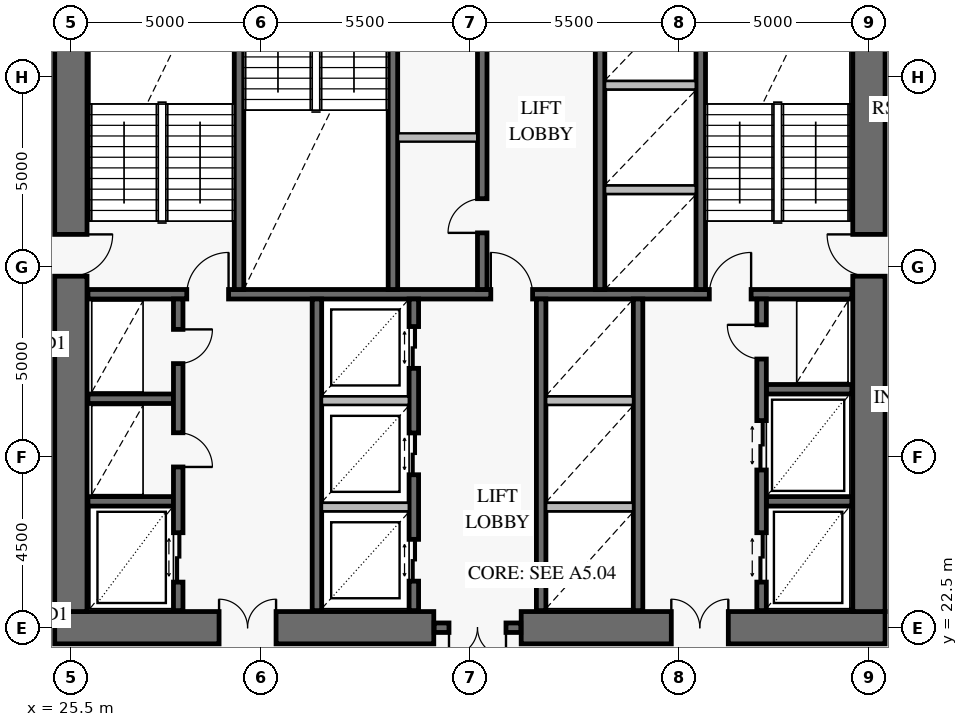
"""IFC4 building model, lengths in metres.
Left out: names, types, materials, properties, quantities, classifications, styles, units other than length and angle.
Written with IfcOpenShell. Run it as: python <this file> out.ifc"""

import sys

from ifc_helpers import new_model, si_unit, direction, frame, frame_2d, origin, place, context, subcontext, project, spatial, rectangle, extrude, element, fill, save


model = new_model("IFC4")
c1 = context("Model", 3, precision=1e-05, world=origin(), true_north=direction((0.0, 1.0)))
c2 = subcontext(c1, "Body", "Model", "MODEL_VIEW")
j1 = project(units=[si_unit("LENGTHUNIT", "METRE"), si_unit("PLANEANGLEUNIT", "RADIAN")], contexts=[c1])
p1 = place(None, origin())
s1 = spatial("IfcSite", under=j1, at=p1, CompositionType="ELEMENT")
p2 = place(p1, origin())
s2 = spatial("IfcBuilding", under=s1, at=p2, CompositionType="ELEMENT")
p3 = place(p2, frame((0.0, 0.0, 41.4)))
s3 = spatial("IfcBuildingStorey", under=s2, at=p3, CompositionType="ELEMENT", Elevation=41.4)
p4 = place(p3, frame((25.075, 22.5, 0.0), z_axis=(0.0, 0.0, 1.0), x_axis=(1.0, 0.0, 0.0)))
e1 = element("IfcWall", 1, at=p4, inside=s3, PredefinedType="SHEAR", context=c2, shape_type="SweptSolid", body=[
    extrude(rectangle(XDim=9.975, YDim=0.85, at=frame_2d((4.988, 0.0))), origin(), (0.0, 0.0, 1.0), 4.2),
])
p5 = place(p4, frame((4.325, 0.0, 0.0)))
e2 = element("IfcOpeningElement", 2, at=p5, cuts=e1, PredefinedType="OPENING", context=c2, shape_type="SweptSolid", body=[
    extrude(rectangle(XDim=1.5, YDim=2.15, at=frame_2d((0.75, 1.075))), frame((0.0, 0.437, 0.0), z_axis=(0.0, -1.0, 0.0), x_axis=(1.0, 0.0, 0.0)), (0.0, 0.0, 1.0), 0.874),
])
p6 = place(p3, frame((37.35, 22.5, 0.0), z_axis=(0.0, 0.0, 1.0), x_axis=(1.0, 0.0, 0.0)))
e3 = element("IfcWall", 3, at=p6, inside=s3, PredefinedType="SHEAR", context=c2, shape_type="SweptSolid", body=[
    extrude(rectangle(XDim=9.575, YDim=0.85, at=frame_2d((4.788, 0.0))), origin(), (0.0, 0.0, 1.0), 4.2),
])
p7 = place(p6, frame((3.95, 0.0, 0.0)))
e4 = element("IfcOpeningElement", 4, at=p7, cuts=e3, PredefinedType="OPENING", context=c2, shape_type="SweptSolid", body=[
    extrude(rectangle(XDim=1.5, YDim=2.15, at=frame_2d((0.75, 1.075))), frame((0.0, 0.437, 0.0), z_axis=(0.0, -1.0, 0.0), x_axis=(1.0, 0.0, 0.0)), (0.0, 0.0, 1.0), 0.874),
])
p8 = place(p3, frame((25.5, 22.925, 0.0), z_axis=(0.0, 0.0, 1.0), x_axis=(0.0, 1.0, 0.0)))
e5 = element("IfcWall", 5, at=p8, inside=s3, PredefinedType="SHEAR", context=c2, shape_type="SweptSolid", body=[
    extrude(rectangle(XDim=18.15, YDim=0.85, at=frame_2d((9.075, 0.0))), origin(), (0.0, 0.0, 1.0), 4.2),
])
p9 = place(p8, frame((8.825, 0.0, 0.0)))
e6 = element("IfcOpeningElement", 6, at=p9, cuts=e5, PredefinedType="OPENING", context=c2, shape_type="SweptSolid", body=[
    extrude(rectangle(XDim=1.1, YDim=2.15, at=frame_2d((0.55, 1.075))), frame((0.0, 0.437, 0.0), z_axis=(0.0, -1.0, 0.0), x_axis=(1.0, 0.0, 0.0)), (0.0, 0.0, 1.0), 0.874),
])
p10 = place(p3, frame((46.5, 22.925, 0.0), z_axis=(0.0, 0.0, 1.0), x_axis=(0.0, 1.0, 0.0)))
e7 = element("IfcWall", 7, at=p10, inside=s3, PredefinedType="SHEAR", context=c2, shape_type="SweptSolid", body=[
    extrude(rectangle(XDim=18.15, YDim=0.85, at=frame_2d((9.075, 0.0))), origin(), (0.0, 0.0, 1.0), 4.2),
])
p11 = place(p10, frame((8.825, 0.0, 0.0)))
e8 = element("IfcOpeningElement", 8, at=p11, cuts=e7, PredefinedType="OPENING", context=c2, shape_type="SweptSolid", body=[
    extrude(rectangle(XDim=1.1, YDim=2.15, at=frame_2d((0.55, 1.075))), frame((0.0, 0.437, 0.0), z_axis=(0.0, -1.0, 0.0), x_axis=(1.0, 0.0, 0.0)), (0.0, 0.0, 1.0), 0.874),
])
p12 = place(p3, frame((35.06, 22.5, 0.0), z_axis=(0.0, 0.0, 1.0), x_axis=(1.0, 0.0, 0.0)))
e9 = element("IfcWall", 9, at=p12, inside=s3, PredefinedType="SOLIDWALL", context=c2, shape_type="SweptSolid", body=[
    extrude(rectangle(XDim=2.28, YDim=0.25, at=frame_2d((1.14, 0.0))), origin(), (0.0, 0.0, 1.0), 4.2),
])
p13 = place(p12, frame((0.39, 0.0, 0.0)))
e10 = element("IfcOpeningElement", 10, at=p13, cuts=e9, PredefinedType="OPENING", context=c2, shape_type="SweptSolid", body=[
    extrude(rectangle(XDim=1.5, YDim=2.15, at=frame_2d((0.75, 1.075))), frame((0.0, 0.137, 0.0), z_axis=(0.0, -1.0, 0.0), x_axis=(1.0, 0.0, 0.0)), (0.0, 0.0, 1.0), 0.274),
])
p14 = place(p3, frame((25.95, 31.275, 0.0), z_axis=(0.0, 0.0, 1.0), x_axis=(1.0, 0.0, 0.0)))
e11 = element("IfcWall", 11, at=p14, inside=s3, PredefinedType="SOLIDWALL", context=c2, shape_type="SweptSolid", body=[
    extrude(rectangle(XDim=20.1, YDim=0.25, at=frame_2d((10.05, 0.0))), origin(), (0.0, 0.0, 1.0), 4.2),
])
p15 = place(p14, frame((2.6, 0.0, 0.0)))
e12 = element("IfcOpeningElement", 12, at=p15, cuts=e11, PredefinedType="OPENING", context=c2, shape_type="SweptSolid", body=[
    extrude(rectangle(XDim=1.1, YDim=2.15, at=frame_2d((0.55, 1.075))), frame((0.0, 0.137, 0.0), z_axis=(0.0, -1.0, 0.0), x_axis=(1.0, 0.0, 0.0)), (0.0, 0.0, 1.0), 0.274),
])
p16 = place(p14, frame((10.6, 0.0, 0.0)))
e13 = element("IfcOpeningElement", 13, at=p16, cuts=e11, PredefinedType="OPENING", context=c2, shape_type="SweptSolid", body=[
    extrude(rectangle(XDim=1.1, YDim=2.15, at=frame_2d((0.55, 1.075))), frame((0.0, 0.137, 0.0), z_axis=(0.0, -1.0, 0.0), x_axis=(1.0, 0.0, 0.0)), (0.0, 0.0, 1.0), 0.274),
])
p17 = place(p14, frame((16.35, 0.0, 0.0)))
e14 = element("IfcOpeningElement", 14, at=p17, cuts=e11, PredefinedType="OPENING", context=c2, shape_type="SweptSolid", body=[
    extrude(rectangle(XDim=1.1, YDim=2.15, at=frame_2d((0.55, 1.075))), frame((0.0, 0.137, 0.0), z_axis=(0.0, -1.0, 0.0), x_axis=(1.0, 0.0, 0.0)), (0.0, 0.0, 1.0), 0.274),
])
for number, where, z_axis, x_axis in (
    (15, (29.925, 31.4, 0.0), (0.0, 0.0, 1.0), (0.0, 1.0, 0.0)),
    (16, (33.975, 31.4, 0.0), (0.0, 0.0, 1.0), (0.0, 1.0, 0.0)),
    (17, (42.075, 31.4, 0.0), (0.0, 0.0, 1.0), (0.0, 1.0, 0.0)),
):
    element("IfcWall", number, at=place(p3, frame(where, z_axis=z_axis, x_axis=x_axis)), inside=s3, PredefinedType="SOLIDWALL", context=c2, shape_type="SweptSolid", body=[
        extrude(rectangle(XDim=9.7, YDim=0.25, at=frame_2d((4.85, 0.0))), origin(), (0.0, 0.0, 1.0), 4.2),
    ])
p18 = place(p3, frame((36.325, 31.4, 0.0), z_axis=(0.0, 0.0, 1.0), x_axis=(0.0, 1.0, 0.0)))
e18 = element("IfcWall", 18, at=p18, inside=s3, PredefinedType="SOLIDWALL", context=c2, shape_type="SweptSolid", body=[
    extrude(rectangle(XDim=9.65, YDim=0.25, at=frame_2d((4.825, 0.0))), origin(), (0.0, 0.0, 1.0), 4.2),
])
p19 = place(p18, frame((1.49, 0.0, 0.0)))
e19 = element("IfcOpeningElement", 19, at=p19, cuts=e18, PredefinedType="OPENING", context=c2, shape_type="SweptSolid", body=[
    extrude(rectangle(XDim=0.9, YDim=2.1, at=frame_2d((0.45, 1.05))), frame((0.0, 0.137, 0.0), z_axis=(0.0, -1.0, 0.0), x_axis=(1.0, 0.0, 0.0)), (0.0, 0.0, 1.0), 0.274),
])
p20 = place(p18, frame((6.41, 0.0, 0.0)))
e20 = element("IfcOpeningElement", 20, at=p20, cuts=e18, PredefinedType="OPENING", context=c2, shape_type="SweptSolid", body=[
    extrude(rectangle(XDim=0.9, YDim=2.1, at=frame_2d((0.45, 1.05))), frame((0.0, 0.137, 0.0), z_axis=(0.0, -1.0, 0.0), x_axis=(1.0, 0.0, 0.0)), (0.0, 0.0, 1.0), 0.274),
])
p21 = place(p3, frame((39.425, 31.4, 0.0), z_axis=(0.0, 0.0, 1.0), x_axis=(0.0, 1.0, 0.0)))
e21 = element("IfcWall", 21, at=p21, inside=s3, PredefinedType="SOLIDWALL", context=c2, shape_type="SweptSolid", body=[
    extrude(rectangle(XDim=9.65, YDim=0.25, at=frame_2d((4.825, 0.0))), origin(), (0.0, 0.0, 1.0), 4.2),
])
p22 = place(p21, frame((8.47, 0.0, 0.0)))
e22 = element("IfcOpeningElement", 22, at=p22, cuts=e21, PredefinedType="OPENING", context=c2, shape_type="SweptSolid", body=[
    extrude(rectangle(XDim=0.9, YDim=2.1, at=frame_2d((0.45, 1.05))), frame((0.0, 0.137, 0.0), z_axis=(0.0, -1.0, 0.0), x_axis=(1.0, 0.0, 0.0)), (0.0, 0.0, 1.0), 0.274),
])
for number, where, z_axis, x_axis in (
    (23, (25.95, 25.825, 0.0), (0.0, 0.0, 1.0), (1.0, 0.0, 0.0)),
    (24, (25.95, 28.525, 0.0), (0.0, 0.0, 1.0), (1.0, 0.0, 0.0)),
):
    element("IfcWall", number, at=place(p3, frame(where, z_axis=z_axis, x_axis=x_axis)), inside=s3, PredefinedType="SOLIDWALL", context=c2, shape_type="SweptSolid", body=[
        extrude(rectangle(XDim=2.25, YDim=0.25, at=frame_2d((1.125, 0.0))), origin(), (0.0, 0.0, 1.0), 4.2),
    ])
p23 = place(p3, frame((28.325, 22.95, 0.0), z_axis=(0.0, 0.0, 1.0), x_axis=(0.0, 1.0, 0.0)))
e25 = element("IfcWall", 25, at=p23, inside=s3, PredefinedType="SOLIDWALL", context=c2, shape_type="SweptSolid", body=[
    extrude(rectangle(XDim=8.2, YDim=0.25, at=frame_2d((4.1, 0.0))), origin(), (0.0, 0.0, 1.0), 4.2),
])
p24 = place(p23, frame((0.75, 0.0, 0.0)))
e26 = element("IfcOpeningElement", 26, at=p24, cuts=e25, PredefinedType="OPENING", context=c2, shape_type="SweptSolid", body=[
    extrude(rectangle(XDim=1.3, YDim=2.3, at=frame_2d((0.65, 1.15))), frame((0.0, 0.137, 0.0), z_axis=(0.0, -1.0, 0.0), x_axis=(1.0, 0.0, 0.0)), (0.0, 0.0, 1.0), 0.274),
])
p25 = place(p23, frame((3.78, 0.0, 0.0)))
e27 = element("IfcOpeningElement", 27, at=p25, cuts=e25, PredefinedType="OPENING", context=c2, shape_type="SweptSolid", body=[
    extrude(rectangle(XDim=0.9, YDim=2.1, at=frame_2d((0.45, 1.05))), frame((0.0, 0.137, 0.0), z_axis=(0.0, -1.0, 0.0), x_axis=(1.0, 0.0, 0.0)), (0.0, 0.0, 1.0), 0.274),
])
p26 = place(p23, frame((6.5, 0.0, 0.0)))
e28 = element("IfcOpeningElement", 28, at=p26, cuts=e25, PredefinedType="OPENING", context=c2, shape_type="SweptSolid", body=[
    extrude(rectangle(XDim=0.9, YDim=2.1, at=frame_2d((0.45, 1.05))), frame((0.0, 0.137, 0.0), z_axis=(0.0, -1.0, 0.0), x_axis=(1.0, 0.0, 0.0)), (0.0, 0.0, 1.0), 0.274),
])
p27 = place(p3, frame((31.975, 22.95, 0.0), z_axis=(0.0, 0.0, 1.0), x_axis=(0.0, 1.0, 0.0)))
e29 = element("IfcWall", 29, at=p27, inside=s3, PredefinedType="SOLIDWALL", context=c2, shape_type="SweptSolid", body=[
    extrude(rectangle(XDim=8.2, YDim=0.25, at=frame_2d((4.1, 0.0))), origin(), (0.0, 0.0, 1.0), 4.2),
])
p28 = place(p3, frame((34.525, 22.95, 0.0), z_axis=(0.0, 0.0, 1.0), x_axis=(0.0, 1.0, 0.0)))
e30 = element("IfcWall", 30, at=p28, inside=s3, PredefinedType="SOLIDWALL", context=c2, shape_type="SweptSolid", body=[
    extrude(rectangle(XDim=8.2, YDim=0.25, at=frame_2d((4.1, 0.0))), origin(), (0.0, 0.0, 1.0), 4.2),
])
p29 = place(p28, frame((0.775, 0.0, 0.0)))
e31 = element("IfcOpeningElement", 31, at=p29, cuts=e30, PredefinedType="OPENING", context=c2, shape_type="SweptSolid", body=[
    extrude(rectangle(XDim=1.1, YDim=2.2, at=frame_2d((0.55, 1.1))), frame((0.0, 0.137, 0.0), z_axis=(0.0, -1.0, 0.0), x_axis=(1.0, 0.0, 0.0)), (0.0, 0.0, 1.0), 0.274),
])
p30 = place(p28, frame((3.575, 0.0, 0.0)))
e32 = element("IfcOpeningElement", 32, at=p30, cuts=e30, PredefinedType="OPENING", context=c2, shape_type="SweptSolid", body=[
    extrude(rectangle(XDim=1.1, YDim=2.2, at=frame_2d((0.55, 1.1))), frame((0.0, 0.137, 0.0), z_axis=(0.0, -1.0, 0.0), x_axis=(1.0, 0.0, 0.0)), (0.0, 0.0, 1.0), 0.274),
])
p31 = place(p28, frame((6.375, 0.0, 0.0)))
e33 = element("IfcOpeningElement", 33, at=p31, cuts=e30, PredefinedType="OPENING", context=c2, shape_type="SweptSolid", body=[
    extrude(rectangle(XDim=1.1, YDim=2.2, at=frame_2d((0.55, 1.1))), frame((0.0, 0.137, 0.0), z_axis=(0.0, -1.0, 0.0), x_axis=(1.0, 0.0, 0.0)), (0.0, 0.0, 1.0), 0.274),
])
for number, where, z_axis, x_axis in (
    (34, (37.875, 22.95, 0.0), (0.0, 0.0, 1.0), (0.0, 1.0, 0.0)),
    (35, (40.425, 22.95, 0.0), (0.0, 0.0, 1.0), (0.0, 1.0, 0.0)),
):
    element("IfcWall", number, at=place(p3, frame(where, z_axis=z_axis, x_axis=x_axis)), inside=s3, PredefinedType="SOLIDWALL", context=c2, shape_type="SweptSolid", body=[
        extrude(rectangle(XDim=8.2, YDim=0.25, at=frame_2d((4.1, 0.0))), origin(), (0.0, 0.0, 1.0), 4.2),
    ])
for number, where, z_axis, x_axis in (
    (36, (43.8, 25.825, 0.0), (0.0, 0.0, 1.0), (1.0, 0.0, 0.0)),
    (37, (43.8, 28.775, 0.0), (0.0, 0.0, 1.0), (1.0, 0.0, 0.0)),
):
    element("IfcWall", number, at=place(p3, frame(where, z_axis=z_axis, x_axis=x_axis)), inside=s3, PredefinedType="SOLIDWALL", context=c2, shape_type="SweptSolid", body=[
        extrude(rectangle(XDim=2.25, YDim=0.25, at=frame_2d((1.125, 0.0))), origin(), (0.0, 0.0, 1.0), 4.2),
    ])
p32 = place(p3, frame((43.675, 22.95, 0.0), z_axis=(0.0, 0.0, 1.0), x_axis=(0.0, 1.0, 0.0)))
e38 = element("IfcWall", 38, at=p32, inside=s3, PredefinedType="SOLIDWALL", context=c2, shape_type="SweptSolid", body=[
    extrude(rectangle(XDim=8.2, YDim=0.25, at=frame_2d((4.1, 0.0))), origin(), (0.0, 0.0, 1.0), 4.2),
])
p33 = place(p32, frame((0.75, 0.0, 0.0)))
e39 = element("IfcOpeningElement", 39, at=p33, cuts=e38, PredefinedType="OPENING", context=c2, shape_type="SweptSolid", body=[
    extrude(rectangle(XDim=1.3, YDim=2.3, at=frame_2d((0.65, 1.15))), frame((0.0, 0.137, 0.0), z_axis=(0.0, -1.0, 0.0), x_axis=(1.0, 0.0, 0.0)), (0.0, 0.0, 1.0), 0.274),
])
p34 = place(p32, frame((3.7, 0.0, 0.0)))
e40 = element("IfcOpeningElement", 40, at=p34, cuts=e38, PredefinedType="OPENING", context=c2, shape_type="SweptSolid", body=[
    extrude(rectangle(XDim=1.3, YDim=2.3, at=frame_2d((0.65, 1.15))), frame((0.0, 0.137, 0.0), z_axis=(0.0, -1.0, 0.0), x_axis=(1.0, 0.0, 0.0)), (0.0, 0.0, 1.0), 0.274),
])
p35 = place(p32, frame((6.62, 0.0, 0.0)))
e41 = element("IfcOpeningElement", 41, at=p35, cuts=e38, PredefinedType="OPENING", context=c2, shape_type="SweptSolid", body=[
    extrude(rectangle(XDim=0.9, YDim=2.1, at=frame_2d((0.45, 1.05))), frame((0.0, 0.137, 0.0), z_axis=(0.0, -1.0, 0.0), x_axis=(1.0, 0.0, 0.0)), (0.0, 0.0, 1.0), 0.274),
])
p36 = place(p3, frame((34.108, 35.4, 0.0), z_axis=(0.0, 0.0, 1.0), x_axis=(1.0, 0.0, 0.0)))
e42 = element("IfcWall", 42, at=p36, inside=s3, PredefinedType="PARTITIONING", context=c2, shape_type="SweptSolid", body=[
    extrude(rectangle(XDim=2.084, YDim=0.22, at=frame_2d((1.042, 0.0))), origin(), (0.0, 0.0, 1.0), 3.92),
])
for number, where, z_axis, x_axis in (
    (43, (39.558, 34.025, 0.0), (0.0, 0.0, 1.0), (1.0, 0.0, 0.0)),
    (44, (39.558, 36.775, 0.0), (0.0, 0.0, 1.0), (1.0, 0.0, 0.0)),
):
    element("IfcWall", number, at=place(p3, frame(where, z_axis=z_axis, x_axis=x_axis)), inside=s3, PredefinedType="PARTITIONING", context=c2, shape_type="SweptSolid", body=[
        extrude(rectangle(XDim=2.384, YDim=0.22, at=frame_2d((1.192, 0.0))), origin(), (0.0, 0.0, 1.0), 3.92),
    ])
for number, where, z_axis, x_axis in (
    (45, (32.108, 25.675, 0.0), (0.0, 0.0, 1.0), (1.0, 0.0, 0.0)),
    (46, (32.108, 28.475, 0.0), (0.0, 0.0, 1.0), (1.0, 0.0, 0.0)),
):
    element("IfcWall", number, at=place(p3, frame(where, z_axis=z_axis, x_axis=x_axis)), inside=s3, PredefinedType="PARTITIONING", context=c2, shape_type="SweptSolid", body=[
        extrude(rectangle(XDim=2.284, YDim=0.22, at=frame_2d((1.142, 0.0))), origin(), (0.0, 0.0, 1.0), 3.92),
    ])
for number, where, z_axis, x_axis in (
    (47, (38.008, 25.675, 0.0), (0.0, 0.0, 1.0), (1.0, 0.0, 0.0)),
    (48, (38.008, 28.475, 0.0), (0.0, 0.0, 1.0), (1.0, 0.0, 0.0)),
):
    element("IfcWall", number, at=place(p3, frame(where, z_axis=z_axis, x_axis=x_axis)), inside=s3, PredefinedType="PARTITIONING", context=c2, shape_type="SweptSolid", body=[
        extrude(rectangle(XDim=2.284, YDim=0.22, at=frame_2d((1.142, 0.0))), origin(), (0.0, 0.0, 1.0), 3.92),
    ])
p37 = place(p9, frame((1.1, 0.0, 0.0), z_axis=(0.0, 0.0, 1.0), x_axis=(-1.0, 0.0, 0.0)))
e49 = element("IfcDoor", 49, at=p37, inside=s3, OperationType="SINGLE_SWING_LEFT", PredefinedType="USERDEFINED", context=c2, shape_type="SweptSolid", body=[
    extrude(rectangle(XDim=1.1, YDim=2.15, at=frame_2d((0.55, 1.075))), frame((0.0, 0.025, 0.0), z_axis=(0.0, -1.0, 0.0), x_axis=(1.0, 0.0, 0.0)), (0.0, 0.0, 1.0), 0.05),
])
fill(e6, e49)
p38 = place(p11, origin())
e50 = element("IfcDoor", 50, at=p38, inside=s3, OperationType="SINGLE_SWING_RIGHT", PredefinedType="USERDEFINED", context=c2, shape_type="SweptSolid", body=[
    extrude(rectangle(XDim=1.1, YDim=2.15, at=frame_2d((0.55, 1.075))), frame((0.0, 0.025, 0.0), z_axis=(0.0, -1.0, 0.0), x_axis=(1.0, 0.0, 0.0)), (0.0, 0.0, 1.0), 0.05),
])
fill(e8, e50)
p39 = place(p5, origin())
e51 = element("IfcDoor", 51, at=p39, inside=s3, OperationType="DOUBLE_DOOR_SINGLE_SWING", PredefinedType="DOOR", context=c2, shape_type="SweptSolid", body=[
    extrude(rectangle(XDim=1.5, YDim=2.15, at=frame_2d((0.75, 1.075))), frame((0.0, 0.025, 0.0), z_axis=(0.0, -1.0, 0.0), x_axis=(1.0, 0.0, 0.0)), (0.0, 0.0, 1.0), 0.05),
])
fill(e2, e51)
p40 = place(p7, origin())
e52 = element("IfcDoor", 52, at=p40, inside=s3, OperationType="DOUBLE_DOOR_SINGLE_SWING", PredefinedType="DOOR", context=c2, shape_type="SweptSolid", body=[
    extrude(rectangle(XDim=1.5, YDim=2.15, at=frame_2d((0.75, 1.075))), frame((0.0, 0.025, 0.0), z_axis=(0.0, -1.0, 0.0), x_axis=(1.0, 0.0, 0.0)), (0.0, 0.0, 1.0), 0.05),
])
fill(e4, e52)
p41 = place(p13, frame((1.5, 0.0, 0.0), z_axis=(0.0, 0.0, 1.0), x_axis=(-1.0, 0.0, 0.0)))
e53 = element("IfcDoor", 53, at=p41, inside=s3, OperationType="DOUBLE_DOOR_SINGLE_SWING", PredefinedType="DOOR", context=c2, shape_type="SweptSolid", body=[
    extrude(rectangle(XDim=1.5, YDim=2.15, at=frame_2d((0.75, 1.075))), frame((0.0, 0.025, 0.0), z_axis=(0.0, -1.0, 0.0), x_axis=(1.0, 0.0, 0.0)), (0.0, 0.0, 1.0), 0.05),
])
fill(e10, e53)
p42 = place(p15, origin())
e54 = element("IfcDoor", 54, at=p42, inside=s3, OperationType="SINGLE_SWING_RIGHT", PredefinedType="USERDEFINED", context=c2, shape_type="SweptSolid", body=[
    extrude(rectangle(XDim=1.1, YDim=2.15, at=frame_2d((0.55, 1.075))), frame((0.0, 0.025, 0.0), z_axis=(0.0, -1.0, 0.0), x_axis=(1.0, 0.0, 0.0)), (0.0, 0.0, 1.0), 0.05),
])
fill(e12, e54)
p43 = place(p16, origin())
e55 = element("IfcDoor", 55, at=p43, inside=s3, OperationType="SINGLE_SWING_LEFT", PredefinedType="USERDEFINED", context=c2, shape_type="SweptSolid", body=[
    extrude(rectangle(XDim=1.1, YDim=2.15, at=frame_2d((0.55, 1.075))), frame((0.0, 0.025, 0.0), z_axis=(0.0, -1.0, 0.0), x_axis=(1.0, 0.0, 0.0)), (0.0, 0.0, 1.0), 0.05),
])
fill(e13, e55)
p44 = place(p17, origin())
e56 = element("IfcDoor", 56, at=p44, inside=s3, OperationType="SINGLE_SWING_RIGHT", PredefinedType="USERDEFINED", context=c2, shape_type="SweptSolid", body=[
    extrude(rectangle(XDim=1.1, YDim=2.15, at=frame_2d((0.55, 1.075))), frame((0.0, 0.025, 0.0), z_axis=(0.0, -1.0, 0.0), x_axis=(1.0, 0.0, 0.0)), (0.0, 0.0, 1.0), 0.05),
])
fill(e14, e56)
p45 = place(p19, origin())
e57 = element("IfcDoor", 57, at=p45, inside=s3, OperationType="SINGLE_SWING_LEFT", PredefinedType="DOOR", context=c2, shape_type="SweptSolid", body=[
    extrude(rectangle(XDim=0.9, YDim=2.1, at=frame_2d((0.45, 1.05))), frame((0.0, 0.025, 0.0), z_axis=(0.0, -1.0, 0.0), x_axis=(1.0, 0.0, 0.0)), (0.0, 0.0, 1.0), 0.05),
])
fill(e19, e57)
p46 = place(p24, frame((1.3, 0.0, 0.0), z_axis=(0.0, 0.0, 1.0), x_axis=(-1.0, 0.0, 0.0)))
e58 = element("IfcDoor", 58, at=p46, inside=s3, OperationType="DOUBLE_DOOR_SLIDING", PredefinedType="DOOR", context=c2, shape_type="SweptSolid", body=[
    extrude(rectangle(XDim=1.3, YDim=2.3, at=frame_2d((0.65, 1.15))), frame((0.0, 0.025, 0.0), z_axis=(0.0, -1.0, 0.0), x_axis=(1.0, 0.0, 0.0)), (0.0, 0.0, 1.0), 0.05),
])
fill(e26, e58)
p47 = place(p25, frame((0.9, 0.0, 0.0), z_axis=(0.0, 0.0, 1.0), x_axis=(-1.0, 0.0, 0.0)))
e59 = element("IfcDoor", 59, at=p47, inside=s3, OperationType="SINGLE_SWING_RIGHT", PredefinedType="DOOR", context=c2, shape_type="SweptSolid", body=[
    extrude(rectangle(XDim=0.9, YDim=2.1, at=frame_2d((0.45, 1.05))), frame((0.0, 0.025, 0.0), z_axis=(0.0, -1.0, 0.0), x_axis=(1.0, 0.0, 0.0)), (0.0, 0.0, 1.0), 0.05),
])
fill(e27, e59)
p48 = place(p26, frame((0.9, 0.0, 0.0), z_axis=(0.0, 0.0, 1.0), x_axis=(-1.0, 0.0, 0.0)))
e60 = element("IfcDoor", 60, at=p48, inside=s3, OperationType="SINGLE_SWING_LEFT", PredefinedType="DOOR", context=c2, shape_type="SweptSolid", body=[
    extrude(rectangle(XDim=0.9, YDim=2.1, at=frame_2d((0.45, 1.05))), frame((0.0, 0.025, 0.0), z_axis=(0.0, -1.0, 0.0), x_axis=(1.0, 0.0, 0.0)), (0.0, 0.0, 1.0), 0.05),
])
fill(e28, e60)
p49 = place(p29, frame((1.1, 0.0, 0.0), z_axis=(0.0, 0.0, 1.0), x_axis=(-1.0, 0.0, 0.0)))
e61 = element("IfcDoor", 61, at=p49, inside=s3, OperationType="DOUBLE_DOOR_SLIDING", PredefinedType="DOOR", context=c2, shape_type="SweptSolid", body=[
    extrude(rectangle(XDim=1.1, YDim=2.2, at=frame_2d((0.55, 1.1))), frame((0.0, 0.025, 0.0), z_axis=(0.0, -1.0, 0.0), x_axis=(1.0, 0.0, 0.0)), (0.0, 0.0, 1.0), 0.05),
])
fill(e31, e61)
p50 = place(p30, frame((1.1, 0.0, 0.0), z_axis=(0.0, 0.0, 1.0), x_axis=(-1.0, 0.0, 0.0)))
e62 = element("IfcDoor", 62, at=p50, inside=s3, OperationType="DOUBLE_DOOR_SLIDING", PredefinedType="DOOR", context=c2, shape_type="SweptSolid", body=[
    extrude(rectangle(XDim=1.1, YDim=2.2, at=frame_2d((0.55, 1.1))), frame((0.0, 0.025, 0.0), z_axis=(0.0, -1.0, 0.0), x_axis=(1.0, 0.0, 0.0)), (0.0, 0.0, 1.0), 0.05),
])
fill(e32, e62)
p51 = place(p31, frame((1.1, 0.0, 0.0), z_axis=(0.0, 0.0, 1.0), x_axis=(-1.0, 0.0, 0.0)))
e63 = element("IfcDoor", 63, at=p51, inside=s3, OperationType="DOUBLE_DOOR_SLIDING", PredefinedType="DOOR", context=c2, shape_type="SweptSolid", body=[
    extrude(rectangle(XDim=1.1, YDim=2.2, at=frame_2d((0.55, 1.1))), frame((0.0, 0.025, 0.0), z_axis=(0.0, -1.0, 0.0), x_axis=(1.0, 0.0, 0.0)), (0.0, 0.0, 1.0), 0.05),
])
fill(e33, e63)
p52 = place(p33, origin())
e64 = element("IfcDoor", 64, at=p52, inside=s3, OperationType="DOUBLE_DOOR_SLIDING", PredefinedType="DOOR", context=c2, shape_type="SweptSolid", body=[
    extrude(rectangle(XDim=1.3, YDim=2.3, at=frame_2d((0.65, 1.15))), frame((0.0, 0.025, 0.0), z_axis=(0.0, -1.0, 0.0), x_axis=(1.0, 0.0, 0.0)), (0.0, 0.0, 1.0), 0.05),
])
fill(e39, e64)
p53 = place(p34, origin())
e65 = element("IfcDoor", 65, at=p53, inside=s3, OperationType="DOUBLE_DOOR_SLIDING", PredefinedType="DOOR", context=c2, shape_type="SweptSolid", body=[
    extrude(rectangle(XDim=1.3, YDim=2.3, at=frame_2d((0.65, 1.15))), frame((0.0, 0.025, 0.0), z_axis=(0.0, -1.0, 0.0), x_axis=(1.0, 0.0, 0.0)), (0.0, 0.0, 1.0), 0.05),
])
fill(e40, e65)
p54 = place(p35, origin())
e66 = element("IfcDoor", 66, at=p54, inside=s3, OperationType="SINGLE_SWING_RIGHT", PredefinedType="DOOR", context=c2, shape_type="SweptSolid", body=[
    extrude(rectangle(XDim=0.9, YDim=2.1, at=frame_2d((0.45, 1.05))), frame((0.0, 0.025, 0.0), z_axis=(0.0, -1.0, 0.0), x_axis=(1.0, 0.0, 0.0)), (0.0, 0.0, 1.0), 0.05),
])
fill(e41, e66)
save(model, sys.argv[1])
